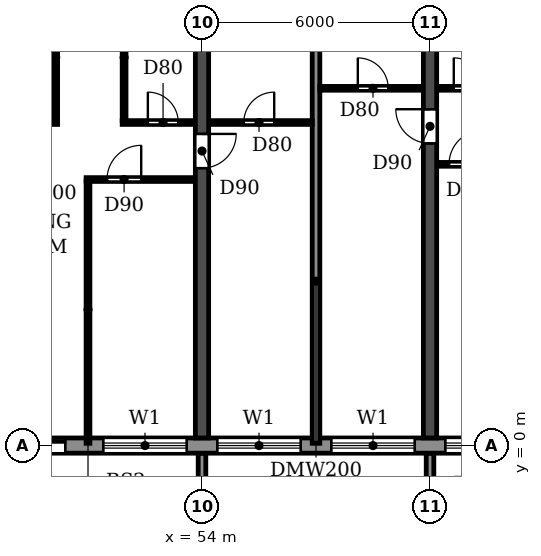
"""IFC4 building model, lengths in metres.
Left out: names, types, materials, properties, quantities, classifications, styles, units other than length and angle.
Written with IfcOpenShell. Run it as: python <this file> out.ifc"""

import sys

from ifc_helpers import new_model, si_unit, direction, frame, frame_2d, origin, place, context, subcontext, project, spatial, polyline, rectangle, outline, extrude, source, transform, mapped, element, fill, save


model = new_model("IFC4")
c1 = context("Model", 3, precision=1e-05, world=origin(), true_north=direction((0.0, 1.0)))
c2 = subcontext(c1, "Body", "Model", "MODEL_VIEW")
j1 = project(units=[si_unit("LENGTHUNIT", "METRE"), si_unit("PLANEANGLEUNIT", "RADIAN")], contexts=[c1])
p1 = place(None, origin())
s1 = spatial("IfcSite", under=j1, at=p1, CompositionType="ELEMENT")
p2 = place(p1, origin())
s2 = spatial("IfcBuilding", under=s1, at=p2, CompositionType="ELEMENT")
p3 = place(p2, frame((0.0, 0.0, 109.2)))
s3 = spatial("IfcBuildingStorey", under=s2, at=p3, CompositionType="ELEMENT", Elevation=109.2)
p4 = place(p3, frame((54.0, 0.2, 0.0), z_axis=(0.0, 0.0, 1.0), x_axis=(0.0, 1.0, 0.0)))
e1 = element("IfcWall", 1, at=p4, inside=s3, PredefinedType="SHEAR", context=c2, shape_type="SweptSolid", body=[
    extrude(rectangle(XDim=11.675, YDim=0.35, at=frame_2d((5.837, 0.0))), origin(), (0.0, 0.0, 1.0), 3.06),
])
p5 = place(p4, frame((7.1, 0.0, 0.0)))
e2 = element("IfcOpeningElement", 2, at=p5, cuts=e1, PredefinedType="OPENING", context=c2, shape_type="SweptSolid", body=[
    extrude(rectangle(XDim=0.9, YDim=2.1, at=frame_2d((0.45, 1.05))), frame((0.0, 0.185, 0.0), z_axis=(0.0, -1.0, 0.0), x_axis=(1.0, 0.0, 0.0)), (0.0, 0.0, 1.0), 0.37),
])
p6 = place(p3, frame((60.0, 0.2, 0.0), z_axis=(0.0, 0.0, 1.0), x_axis=(0.0, 1.0, 0.0)))
e3 = element("IfcWall", 3, at=p6, inside=s3, PredefinedType="SHEAR", context=c2, shape_type="SweptSolid", body=[
    extrude(rectangle(XDim=11.675, YDim=0.35, at=frame_2d((5.837, 0.0))), origin(), (0.0, 0.0, 1.0), 3.06),
])
p7 = place(p6, frame((7.75, 0.0, 0.0)))
e4 = element("IfcOpeningElement", 4, at=p7, cuts=e3, PredefinedType="OPENING", context=c2, shape_type="SweptSolid", body=[
    extrude(rectangle(XDim=0.9, YDim=2.1, at=frame_2d((0.45, 1.05))), frame((0.0, 0.185, 0.0), z_axis=(0.0, -1.0, 0.0), x_axis=(1.0, 0.0, 0.0)), (0.0, 0.0, 1.0), 0.37),
])
p8 = place(p3, frame((16.683, 0.0, 0.0), z_axis=(0.0, 0.0, 1.0), x_axis=(1.0, 0.0, 0.0)))
e5 = element("IfcWall", 5, at=p8, inside=s3, PredefinedType="STANDARD", context=c2, shape_type="SweptSolid", body=[
    extrude(rectangle(XDim=68.634, YDim=0.4, at=frame_2d((34.317, 0.0))), origin(), (0.0, 0.0, 1.0), 3.06),
])
p9 = place(p8, frame((1.717, 0.0, 0.9)))
e6 = element("IfcOpeningElement", 6, at=p9, cuts=e5, PredefinedType="OPENING", context=c2, shape_type="SweptSolid", body=[
    extrude(rectangle(XDim=2.2, YDim=1.5, at=frame_2d((1.1, 0.75))), frame((0.0, 0.21, 0.0), z_axis=(0.0, -1.0, 0.0), x_axis=(1.0, 0.0, 0.0)), (0.0, 0.0, 1.0), 0.42),
])
p10 = place(p8, frame((4.717, 0.0, 0.9)))
e7 = element("IfcOpeningElement", 7, at=p10, cuts=e5, PredefinedType="OPENING", context=c2, shape_type="SweptSolid", body=[
    extrude(rectangle(XDim=2.2, YDim=1.5, at=frame_2d((1.1, 0.75))), frame((0.0, 0.21, 0.0), z_axis=(0.0, -1.0, 0.0), x_axis=(1.0, 0.0, 0.0)), (0.0, 0.0, 1.0), 0.42),
])
p11 = place(p8, frame((7.717, 0.0, 0.9)))
e8 = element("IfcOpeningElement", 8, at=p11, cuts=e5, PredefinedType="OPENING", context=c2, shape_type="SweptSolid", body=[
    extrude(rectangle(XDim=2.2, YDim=1.5, at=frame_2d((1.1, 0.75))), frame((0.0, 0.21, 0.0), z_axis=(0.0, -1.0, 0.0), x_axis=(1.0, 0.0, 0.0)), (0.0, 0.0, 1.0), 0.42),
])
p12 = place(p8, frame((10.917, 0.0, 0.0)))
e9 = element("IfcOpeningElement", 9, at=p12, cuts=e5, PredefinedType="OPENING", context=c2, shape_type="SweptSolid", body=[
    extrude(rectangle(XDim=1.8, YDim=2.4, at=frame_2d((0.9, 1.2))), frame((0.0, 0.21, 0.0), z_axis=(0.0, -1.0, 0.0), x_axis=(1.0, 0.0, 0.0)), (0.0, 0.0, 1.0), 0.42),
])
p13 = place(p8, frame((13.717, 0.0, 0.9)))
e10 = element("IfcOpeningElement", 10, at=p13, cuts=e5, PredefinedType="OPENING", context=c2, shape_type="SweptSolid", body=[
    extrude(rectangle(XDim=2.2, YDim=1.5, at=frame_2d((1.1, 0.75))), frame((0.0, 0.21, 0.0), z_axis=(0.0, -1.0, 0.0), x_axis=(1.0, 0.0, 0.0)), (0.0, 0.0, 1.0), 0.42),
])
p14 = place(p8, frame((16.717, 0.0, 0.9)))
e11 = element("IfcOpeningElement", 11, at=p14, cuts=e5, PredefinedType="OPENING", context=c2, shape_type="SweptSolid", body=[
    extrude(rectangle(XDim=2.2, YDim=1.5, at=frame_2d((1.1, 0.75))), frame((0.0, 0.21, 0.0), z_axis=(0.0, -1.0, 0.0), x_axis=(1.0, 0.0, 0.0)), (0.0, 0.0, 1.0), 0.42),
])
p15 = place(p8, frame((19.717, 0.0, 0.9)))
e12 = element("IfcOpeningElement", 12, at=p15, cuts=e5, PredefinedType="OPENING", context=c2, shape_type="SweptSolid", body=[
    extrude(rectangle(XDim=2.2, YDim=1.5, at=frame_2d((1.1, 0.75))), frame((0.0, 0.21, 0.0), z_axis=(0.0, -1.0, 0.0), x_axis=(1.0, 0.0, 0.0)), (0.0, 0.0, 1.0), 0.42),
])
p16 = place(p8, frame((22.717, 0.0, 0.9)))
e13 = element("IfcOpeningElement", 13, at=p16, cuts=e5, PredefinedType="OPENING", context=c2, shape_type="SweptSolid", body=[
    extrude(rectangle(XDim=2.2, YDim=1.5, at=frame_2d((1.1, 0.75))), frame((0.0, 0.21, 0.0), z_axis=(0.0, -1.0, 0.0), x_axis=(1.0, 0.0, 0.0)), (0.0, 0.0, 1.0), 0.42),
])
p17 = place(p8, frame((25.717, 0.0, 0.9)))
e14 = element("IfcOpeningElement", 14, at=p17, cuts=e5, PredefinedType="OPENING", context=c2, shape_type="SweptSolid", body=[
    extrude(rectangle(XDim=2.2, YDim=1.5, at=frame_2d((1.1, 0.75))), frame((0.0, 0.21, 0.0), z_axis=(0.0, -1.0, 0.0), x_axis=(1.0, 0.0, 0.0)), (0.0, 0.0, 1.0), 0.42),
])
p18 = place(p8, frame((28.717, 0.0, 0.9)))
e15 = element("IfcOpeningElement", 15, at=p18, cuts=e5, PredefinedType="OPENING", context=c2, shape_type="SweptSolid", body=[
    extrude(rectangle(XDim=2.2, YDim=1.5, at=frame_2d((1.1, 0.75))), frame((0.0, 0.21, 0.0), z_axis=(0.0, -1.0, 0.0), x_axis=(1.0, 0.0, 0.0)), (0.0, 0.0, 1.0), 0.42),
])
p19 = place(p8, frame((31.917, 0.0, 0.0)))
e16 = element("IfcOpeningElement", 16, at=p19, cuts=e5, PredefinedType="OPENING", context=c2, shape_type="SweptSolid", body=[
    extrude(rectangle(XDim=1.8, YDim=2.4, at=frame_2d((0.9, 1.2))), frame((0.0, 0.21, 0.0), z_axis=(0.0, -1.0, 0.0), x_axis=(1.0, 0.0, 0.0)), (0.0, 0.0, 1.0), 0.42),
])
p20 = place(p8, frame((34.717, 0.0, 0.9)))
e17 = element("IfcOpeningElement", 17, at=p20, cuts=e5, PredefinedType="OPENING", context=c2, shape_type="SweptSolid", body=[
    extrude(rectangle(XDim=2.2, YDim=1.5, at=frame_2d((1.1, 0.75))), frame((0.0, 0.21, 0.0), z_axis=(0.0, -1.0, 0.0), x_axis=(1.0, 0.0, 0.0)), (0.0, 0.0, 1.0), 0.42),
])
p21 = place(p8, frame((37.717, 0.0, 0.9)))
e18 = element("IfcOpeningElement", 18, at=p21, cuts=e5, PredefinedType="OPENING", context=c2, shape_type="SweptSolid", body=[
    extrude(rectangle(XDim=2.2, YDim=1.5, at=frame_2d((1.1, 0.75))), frame((0.0, 0.21, 0.0), z_axis=(0.0, -1.0, 0.0), x_axis=(1.0, 0.0, 0.0)), (0.0, 0.0, 1.0), 0.42),
])
p22 = place(p8, frame((40.717, 0.0, 0.9)))
e19 = element("IfcOpeningElement", 19, at=p22, cuts=e5, PredefinedType="OPENING", context=c2, shape_type="SweptSolid", body=[
    extrude(rectangle(XDim=2.2, YDim=1.5, at=frame_2d((1.1, 0.75))), frame((0.0, 0.21, 0.0), z_axis=(0.0, -1.0, 0.0), x_axis=(1.0, 0.0, 0.0)), (0.0, 0.0, 1.0), 0.42),
])
p23 = place(p8, frame((43.717, 0.0, 0.9)))
e20 = element("IfcOpeningElement", 20, at=p23, cuts=e5, PredefinedType="OPENING", context=c2, shape_type="SweptSolid", body=[
    extrude(rectangle(XDim=2.2, YDim=1.5, at=frame_2d((1.1, 0.75))), frame((0.0, 0.21, 0.0), z_axis=(0.0, -1.0, 0.0), x_axis=(1.0, 0.0, 0.0)), (0.0, 0.0, 1.0), 0.42),
])
p24 = place(p8, frame((46.917, 0.0, 0.0)))
e21 = element("IfcOpeningElement", 21, at=p24, cuts=e5, PredefinedType="OPENING", context=c2, shape_type="SweptSolid", body=[
    extrude(rectangle(XDim=1.8, YDim=2.4, at=frame_2d((0.9, 1.2))), frame((0.0, 0.21, 0.0), z_axis=(0.0, -1.0, 0.0), x_axis=(1.0, 0.0, 0.0)), (0.0, 0.0, 1.0), 0.42),
])
p25 = place(p8, frame((49.717, 0.0, 0.9)))
e22 = element("IfcOpeningElement", 22, at=p25, cuts=e5, PredefinedType="OPENING", context=c2, shape_type="SweptSolid", body=[
    extrude(rectangle(XDim=2.2, YDim=1.5, at=frame_2d((1.1, 0.75))), frame((0.0, 0.21, 0.0), z_axis=(0.0, -1.0, 0.0), x_axis=(1.0, 0.0, 0.0)), (0.0, 0.0, 1.0), 0.42),
])
p26 = place(p8, frame((52.717, 0.0, 0.9)))
e23 = element("IfcOpeningElement", 23, at=p26, cuts=e5, PredefinedType="OPENING", context=c2, shape_type="SweptSolid", body=[
    extrude(rectangle(XDim=2.2, YDim=1.5, at=frame_2d((1.1, 0.75))), frame((0.0, 0.21, 0.0), z_axis=(0.0, -1.0, 0.0), x_axis=(1.0, 0.0, 0.0)), (0.0, 0.0, 1.0), 0.42),
])
p27 = place(p8, frame((55.717, 0.0, 0.9)))
e24 = element("IfcOpeningElement", 24, at=p27, cuts=e5, PredefinedType="OPENING", context=c2, shape_type="SweptSolid", body=[
    extrude(rectangle(XDim=2.2, YDim=1.5, at=frame_2d((1.1, 0.75))), frame((0.0, 0.21, 0.0), z_axis=(0.0, -1.0, 0.0), x_axis=(1.0, 0.0, 0.0)), (0.0, 0.0, 1.0), 0.42),
])
p28 = place(p8, frame((58.717, 0.0, 0.9)))
e25 = element("IfcOpeningElement", 25, at=p28, cuts=e5, PredefinedType="OPENING", context=c2, shape_type="SweptSolid", body=[
    extrude(rectangle(XDim=2.2, YDim=1.5, at=frame_2d((1.1, 0.75))), frame((0.0, 0.21, 0.0), z_axis=(0.0, -1.0, 0.0), x_axis=(1.0, 0.0, 0.0)), (0.0, 0.0, 1.0), 0.42),
])
p29 = place(p8, frame((61.717, 0.0, 0.9)))
e26 = element("IfcOpeningElement", 26, at=p29, cuts=e5, PredefinedType="OPENING", context=c2, shape_type="SweptSolid", body=[
    extrude(rectangle(XDim=2.2, YDim=1.5, at=frame_2d((1.1, 0.75))), frame((0.0, 0.21, 0.0), z_axis=(0.0, -1.0, 0.0), x_axis=(1.0, 0.0, 0.0)), (0.0, 0.0, 1.0), 0.42),
])
p30 = place(p8, frame((64.717, 0.0, 0.9)))
e27 = element("IfcOpeningElement", 27, at=p30, cuts=e5, PredefinedType="OPENING", context=c2, shape_type="SweptSolid", body=[
    extrude(rectangle(XDim=2.2, YDim=1.5, at=frame_2d((1.1, 0.75))), frame((0.0, 0.21, 0.0), z_axis=(0.0, -1.0, 0.0), x_axis=(1.0, 0.0, 0.0)), (0.0, 0.0, 1.0), 0.42),
])
m1 = source(origin(), c2, "Body", "SweptSolid", [
    extrude(outline(polyline([(0.0, 0.0), (0.2, 0.0), (0.2, 1.65), (0.0, 1.65), (0.0, 0.0)])), origin(), (0.0, 0.0, 1.0), 3.1),
])
for number, where in (
    (28, (53.9, -1.85, 0.0)),
    (29, (59.9, -1.85, 0.0)),
):
    element("IfcWall", number, at=place(p3, frame(where)), inside=s3, PredefinedType="STANDARD", context=c2, shape_type="MappedRepresentation", body=[
        mapped(m1, transform((0.0, 0.0, 0.0))),
    ])
p31 = place(p3, frame((57.0, 0.06, 0.0), z_axis=(0.0, 0.0, 1.0), x_axis=(0.0, 1.0, 0.0)))
e30 = element("IfcWall", 30, at=p31, inside=s3, PredefinedType="PARTITIONING", context=c2, shape_type="SweptSolid", body=[
    extrude(rectangle(XDim=11.805, YDim=0.2, at=frame_2d((5.902, 0.0))), origin(), (0.0, 0.0, 1.0), 3.06),
])
p32 = place(p3, frame((50.95, 7.0, 0.0), z_axis=(0.0, 0.0, 1.0), x_axis=(1.0, 0.0, 0.0)))
e31 = element("IfcWall", 31, at=p32, inside=s3, PredefinedType="PARTITIONING", context=c2, shape_type="SweptSolid", body=[
    extrude(rectangle(XDim=2.865, YDim=0.1, at=frame_2d((1.433, 0.0))), origin(), (0.0, 0.0, 1.0), 3.06),
])
p33 = place(p32, frame((0.55, 0.0, 0.0)))
e32 = element("IfcOpeningElement", 32, at=p33, cuts=e31, PredefinedType="OPENING", context=c2, shape_type="SweptSolid", body=[
    extrude(rectangle(XDim=0.9, YDim=2.1, at=frame_2d((0.45, 1.05))), frame((0.0, 0.06, 0.0), z_axis=(0.0, -1.0, 0.0), x_axis=(1.0, 0.0, 0.0)), (0.0, 0.0, 1.0), 0.12),
])
p34 = place(p3, frame((60.185, 7.4, 0.0), z_axis=(0.0, 0.0, 1.0), x_axis=(1.0, 0.0, 0.0)))
e33 = element("IfcWall", 33, at=p34, inside=s3, PredefinedType="PARTITIONING", context=c2, shape_type="SweptSolid", body=[
    extrude(rectangle(XDim=2.865, YDim=0.1, at=frame_2d((1.433, 0.0))), origin(), (0.0, 0.0, 1.0), 3.06),
])
p35 = place(p34, frame((0.315, 0.0, 0.0)))
e34 = element("IfcOpeningElement", 34, at=p35, cuts=e33, PredefinedType="OPENING", context=c2, shape_type="SweptSolid", body=[
    extrude(rectangle(XDim=0.9, YDim=2.1, at=frame_2d((0.45, 1.05))), frame((0.0, 0.06, 0.0), z_axis=(0.0, -1.0, 0.0), x_axis=(1.0, 0.0, 0.0)), (0.0, 0.0, 1.0), 0.12),
])
p36 = place(p3, frame((48.185, 8.5, 0.0), z_axis=(0.0, 0.0, 1.0), x_axis=(1.0, 0.0, 0.0)))
e35 = element("IfcWall", 35, at=p36, inside=s3, PredefinedType="PARTITIONING", context=c2, shape_type="SweptSolid", body=[
    extrude(rectangle(XDim=2.015, YDim=0.1, at=frame_2d((1.007, 0.0))), origin(), (0.0, 0.0, 1.0), 3.06),
])
p37 = place(p36, frame((0.44, 0.0, 0.0)))
e36 = element("IfcOpeningElement", 36, at=p37, cuts=e35, PredefinedType="OPENING", context=c2, shape_type="SweptSolid", body=[
    extrude(rectangle(XDim=0.9, YDim=2.1, at=frame_2d((0.45, 1.05))), frame((0.0, 0.06, 0.0), z_axis=(0.0, -1.0, 0.0), x_axis=(1.0, 0.0, 0.0)), (0.0, 0.0, 1.0), 0.12),
])
p38 = place(p3, frame((51.9, 8.5, 0.0), z_axis=(0.0, 0.0, 1.0), x_axis=(1.0, 0.0, 0.0)))
e37 = element("IfcWall", 37, at=p38, inside=s3, PredefinedType="PARTITIONING", context=c2, shape_type="SweptSolid", body=[
    extrude(rectangle(XDim=1.915, YDim=0.1, at=frame_2d((0.958, 0.0))), origin(), (0.0, 0.0, 1.0), 3.06),
])
p39 = place(p38, frame((0.675, 0.0, 0.0)))
e38 = element("IfcOpeningElement", 38, at=p39, cuts=e37, PredefinedType="OPENING", context=c2, shape_type="SweptSolid", body=[
    extrude(rectangle(XDim=0.8, YDim=2.1, at=frame_2d((0.4, 1.05))), frame((0.0, 0.06, 0.0), z_axis=(0.0, -1.0, 0.0), x_axis=(1.0, 0.0, 0.0)), (0.0, 0.0, 1.0), 0.12),
])
p40 = place(p3, frame((54.185, 8.5, 0.0), z_axis=(0.0, 0.0, 1.0), x_axis=(1.0, 0.0, 0.0)))
e39 = element("IfcWall", 39, at=p40, inside=s3, PredefinedType="PARTITIONING", context=c2, shape_type="SweptSolid", body=[
    extrude(rectangle(XDim=2.715, YDim=0.1, at=frame_2d((1.357, 0.0))), origin(), (0.0, 0.0, 1.0), 3.06),
])
p41 = place(p40, frame((0.915, 0.0, 0.0)))
e40 = element("IfcOpeningElement", 40, at=p41, cuts=e39, PredefinedType="OPENING", context=c2, shape_type="SweptSolid", body=[
    extrude(rectangle(XDim=0.8, YDim=2.1, at=frame_2d((0.4, 1.05))), frame((0.0, 0.06, 0.0), z_axis=(0.0, -1.0, 0.0), x_axis=(1.0, 0.0, 0.0)), (0.0, 0.0, 1.0), 0.12),
])
p42 = place(p3, frame((57.1, 9.4, 0.0), z_axis=(0.0, 0.0, 1.0), x_axis=(1.0, 0.0, 0.0)))
e41 = element("IfcWall", 41, at=p42, inside=s3, PredefinedType="PARTITIONING", context=c2, shape_type="SweptSolid", body=[
    extrude(rectangle(XDim=2.715, YDim=0.1, at=frame_2d((1.357, 0.0))), origin(), (0.0, 0.0, 1.0), 3.06),
])
p43 = place(p42, frame((1.0, 0.0, 0.0)))
e42 = element("IfcOpeningElement", 42, at=p43, cuts=e41, PredefinedType="OPENING", context=c2, shape_type="SweptSolid", body=[
    extrude(rectangle(XDim=0.8, YDim=2.1, at=frame_2d((0.4, 1.05))), frame((0.0, 0.06, 0.0), z_axis=(0.0, -1.0, 0.0), x_axis=(1.0, 0.0, 0.0)), (0.0, 0.0, 1.0), 0.12),
])
p44 = place(p3, frame((60.185, 9.4, 0.0), z_axis=(0.0, 0.0, 1.0), x_axis=(1.0, 0.0, 0.0)))
e43 = element("IfcWall", 43, at=p44, inside=s3, PredefinedType="PARTITIONING", context=c2, shape_type="SweptSolid", body=[
    extrude(rectangle(XDim=1.915, YDim=0.1, at=frame_2d((0.958, 0.0))), origin(), (0.0, 0.0, 1.0), 3.06),
])
p45 = place(p44, frame((0.44, 0.0, 0.0)))
e44 = element("IfcOpeningElement", 44, at=p45, cuts=e43, PredefinedType="OPENING", context=c2, shape_type="SweptSolid", body=[
    extrude(rectangle(XDim=0.8, YDim=2.1, at=frame_2d((0.4, 1.05))), frame((0.0, 0.06, 0.0), z_axis=(0.0, -1.0, 0.0), x_axis=(1.0, 0.0, 0.0)), (0.0, 0.0, 1.0), 0.12),
])
p46 = place(p3, frame((50.15, 8.55, 0.0), z_axis=(0.0, 0.0, 1.0), x_axis=(0.0, 1.0, 0.0)))
e45 = element("IfcWall", 45, at=p46, inside=s3, PredefinedType="PARTITIONING", context=c2, shape_type="SweptSolid", body=[
    extrude(rectangle(XDim=3.315, YDim=0.1, at=frame_2d((1.657, 0.0))), origin(), (0.0, 0.0, 1.0), 3.06),
])
p47 = place(p3, frame((51.0, 0.06, 0.0), z_axis=(0.0, 0.0, 1.0), x_axis=(0.0, 1.0, 0.0)))
e46 = element("IfcWall", 46, at=p47, inside=s3, PredefinedType="PARTITIONING", context=c2, shape_type="SweptSolid", body=[
    extrude(rectangle(XDim=6.89, YDim=0.1, at=frame_2d((3.445, 0.0))), origin(), (0.0, 0.0, 1.0), 3.06),
])
p48 = place(p3, frame((51.95, 8.55, 0.0), z_axis=(0.0, 0.0, 1.0), x_axis=(0.0, 1.0, 0.0)))
e47 = element("IfcWall", 47, at=p48, inside=s3, PredefinedType="PARTITIONING", context=c2, shape_type="SweptSolid", body=[
    extrude(rectangle(XDim=3.315, YDim=0.1, at=frame_2d((1.657, 0.0))), origin(), (0.0, 0.0, 1.0), 3.06),
])
p49 = place(p19, origin())
e48 = element("IfcDoor", 48, at=p49, inside=s3, OperationType="DOUBLE_DOOR_SLIDING", PredefinedType="DOOR", context=c2, shape_type="SweptSolid", body=[
    extrude(rectangle(XDim=1.8, YDim=2.4, at=frame_2d((0.9, 1.2))), frame((0.0, 0.025, 0.0), z_axis=(0.0, -1.0, 0.0), x_axis=(1.0, 0.0, 0.0)), (0.0, 0.0, 1.0), 0.05),
])
fill(e16, e48)
p50 = place(p20, origin())
e49 = element("IfcWindow", 49, at=p50, inside=s3, PartitioningType="DOUBLE_PANEL_HORIZONTAL", PredefinedType="WINDOW", context=c2, shape_type="SweptSolid", body=[
    extrude(rectangle(XDim=2.2, YDim=1.5, at=frame_2d((1.1, 0.75))), frame((0.0, 0.03, 0.0), z_axis=(0.0, -1.0, 0.0), x_axis=(1.0, 0.0, 0.0)), (0.0, 0.0, 1.0), 0.06),
])
fill(e17, e49)
p51 = place(p21, origin())
e50 = element("IfcWindow", 50, at=p51, inside=s3, PartitioningType="DOUBLE_PANEL_HORIZONTAL", PredefinedType="WINDOW", context=c2, shape_type="SweptSolid", body=[
    extrude(rectangle(XDim=2.2, YDim=1.5, at=frame_2d((1.1, 0.75))), frame((0.0, 0.03, 0.0), z_axis=(0.0, -1.0, 0.0), x_axis=(1.0, 0.0, 0.0)), (0.0, 0.0, 1.0), 0.06),
])
fill(e18, e50)
p52 = place(p22, origin())
e51 = element("IfcWindow", 51, at=p52, inside=s3, PartitioningType="DOUBLE_PANEL_HORIZONTAL", PredefinedType="WINDOW", context=c2, shape_type="SweptSolid", body=[
    extrude(rectangle(XDim=2.2, YDim=1.5, at=frame_2d((1.1, 0.75))), frame((0.0, 0.03, 0.0), z_axis=(0.0, -1.0, 0.0), x_axis=(1.0, 0.0, 0.0)), (0.0, 0.0, 1.0), 0.06),
])
fill(e19, e51)
p53 = place(p23, origin())
e52 = element("IfcWindow", 52, at=p53, inside=s3, PartitioningType="DOUBLE_PANEL_HORIZONTAL", PredefinedType="WINDOW", context=c2, shape_type="SweptSolid", body=[
    extrude(rectangle(XDim=2.2, YDim=1.5, at=frame_2d((1.1, 0.75))), frame((0.0, 0.03, 0.0), z_axis=(0.0, -1.0, 0.0), x_axis=(1.0, 0.0, 0.0)), (0.0, 0.0, 1.0), 0.06),
])
fill(e20, e52)
p54 = place(p41, origin())
e53 = element("IfcDoor", 53, at=p54, inside=s3, OperationType="SINGLE_SWING_RIGHT", PredefinedType="DOOR", context=c2, shape_type="SweptSolid", body=[
    extrude(rectangle(XDim=0.8, YDim=2.1, at=frame_2d((0.4, 1.05))), frame((0.0, 0.025, 0.0), z_axis=(0.0, -1.0, 0.0), x_axis=(1.0, 0.0, 0.0)), (0.0, 0.0, 1.0), 0.05),
])
fill(e40, e53)
p55 = place(p33, origin())
e54 = element("IfcDoor", 54, at=p55, inside=s3, OperationType="SINGLE_SWING_RIGHT", PredefinedType="DOOR", context=c2, shape_type="SweptSolid", body=[
    extrude(rectangle(XDim=0.9, YDim=2.1, at=frame_2d((0.45, 1.05))), frame((0.0, 0.025, 0.0), z_axis=(0.0, -1.0, 0.0), x_axis=(1.0, 0.0, 0.0)), (0.0, 0.0, 1.0), 0.05),
])
fill(e32, e54)
p56 = place(p39, origin())
e55 = element("IfcDoor", 55, at=p56, inside=s3, OperationType="SINGLE_SWING_LEFT", PredefinedType="DOOR", context=c2, shape_type="SweptSolid", body=[
    extrude(rectangle(XDim=0.8, YDim=2.1, at=frame_2d((0.4, 1.05))), frame((0.0, 0.025, 0.0), z_axis=(0.0, -1.0, 0.0), x_axis=(1.0, 0.0, 0.0)), (0.0, 0.0, 1.0), 0.05),
])
fill(e38, e55)
p57 = place(p5, frame((0.9, 0.0, 0.0), z_axis=(0.0, 0.0, 1.0), x_axis=(-1.0, 0.0, 0.0)))
e56 = element("IfcDoor", 56, at=p57, inside=s3, OperationType="SINGLE_SWING_LEFT", PredefinedType="DOOR", context=c2, shape_type="SweptSolid", body=[
    extrude(rectangle(XDim=0.9, YDim=2.1, at=frame_2d((0.45, 1.05))), frame((0.0, 0.025, 0.0), z_axis=(0.0, -1.0, 0.0), x_axis=(1.0, 0.0, 0.0)), (0.0, 0.0, 1.0), 0.05),
])
fill(e2, e56)
p58 = place(p43, origin())
e57 = element("IfcDoor", 57, at=p58, inside=s3, OperationType="SINGLE_SWING_LEFT", PredefinedType="DOOR", context=c2, shape_type="SweptSolid", body=[
    extrude(rectangle(XDim=0.8, YDim=2.1, at=frame_2d((0.4, 1.05))), frame((0.0, 0.025, 0.0), z_axis=(0.0, -1.0, 0.0), x_axis=(1.0, 0.0, 0.0)), (0.0, 0.0, 1.0), 0.05),
])
fill(e42, e57)
p59 = place(p7, origin())
e58 = element("IfcDoor", 58, at=p59, inside=s3, OperationType="SINGLE_SWING_RIGHT", PredefinedType="DOOR", context=c2, shape_type="SweptSolid", body=[
    extrude(rectangle(XDim=0.9, YDim=2.1, at=frame_2d((0.45, 1.05))), frame((0.0, 0.025, 0.0), z_axis=(0.0, -1.0, 0.0), x_axis=(1.0, 0.0, 0.0)), (0.0, 0.0, 1.0), 0.05),
])
fill(e4, e58)
p60 = place(p35, origin())
e59 = element("IfcDoor", 59, at=p60, inside=s3, OperationType="SINGLE_SWING_RIGHT", PredefinedType="DOOR", context=c2, shape_type="SweptSolid", body=[
    extrude(rectangle(XDim=0.9, YDim=2.1, at=frame_2d((0.45, 1.05))), frame((0.0, 0.025, 0.0), z_axis=(0.0, -1.0, 0.0), x_axis=(1.0, 0.0, 0.0)), (0.0, 0.0, 1.0), 0.05),
])
fill(e34, e59)
p61 = place(p45, origin())
e60 = element("IfcDoor", 60, at=p61, inside=s3, OperationType="SINGLE_SWING_LEFT", PredefinedType="DOOR", context=c2, shape_type="SweptSolid", body=[
    extrude(rectangle(XDim=0.8, YDim=2.1, at=frame_2d((0.4, 1.05))), frame((0.0, 0.025, 0.0), z_axis=(0.0, -1.0, 0.0), x_axis=(1.0, 0.0, 0.0)), (0.0, 0.0, 1.0), 0.05),
])
fill(e44, e60)
save(model, sys.argv[1])
